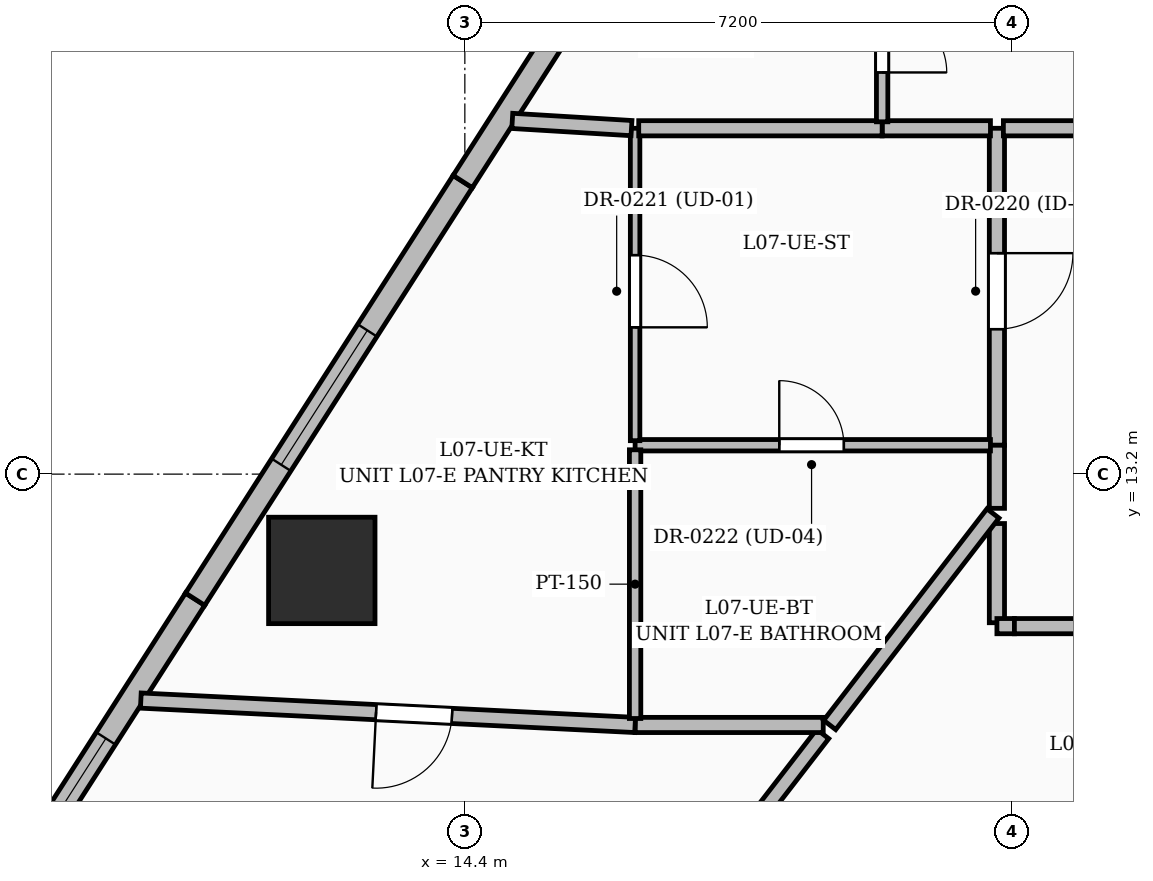
"""IFC4 building model, lengths in metres.
Left out: names, types, materials, properties, quantities, classifications, styles, units other than length and angle.
Written with IfcOpenShell. Run it as: python <this file> out.ifc"""

import sys

from ifc_helpers import new_model, si_unit, direction, frame, frame_2d, origin, origin_2d, place, context, subcontext, project, spatial, rectangle, extrude, element, fill, save


model = new_model("IFC4")
c1 = context("Model", 3, precision=1e-05, world=origin(), true_north=direction((0.0, 1.0)))
c2 = subcontext(c1, "Body", "Model", "MODEL_VIEW")
j1 = project(units=[si_unit("LENGTHUNIT", "METRE"), si_unit("PLANEANGLEUNIT", "RADIAN")], contexts=[c1])
p1 = place(None, origin())
s1 = spatial("IfcSite", under=j1, at=p1, CompositionType="ELEMENT")
p2 = place(p1, origin())
s2 = spatial("IfcBuilding", under=s1, at=p2, CompositionType="ELEMENT")
p3 = place(p2, frame((0.0, 0.0, 35.4)))
s3 = spatial("IfcBuildingStorey", under=s2, at=p3, CompositionType="ELEMENT", Elevation=35.4)
p4 = place(p3, frame((12.518, 11.933, 0.0), z_axis=(0.0, 0.0, 1.0), x_axis=(1.0, 0.0, 0.0)))
e1 = element("IfcColumn", 1, at=p4, inside=s3, PredefinedType="COLUMN", context=c2, shape_type="SweptSolid", body=[
    extrude(rectangle(XDim=1.4, YDim=1.4, at=origin_2d()), origin(), (0.0, 0.0, 1.0), 3.6),
])
p5 = place(p3, frame((7.668, 6.586, 0.0), z_axis=(0.0, 0.0, 1.0), x_axis=(0.539504449159, 0.841982748836, 0.0)))
e2 = element("IfcWall", 2, at=p5, inside=s3, PredefinedType="SOLIDWALL", context=c2, shape_type="SweptSolid", body=[
    extrude(rectangle(XDim=5.901, YDim=0.3, at=frame_2d((2.95, 0.0))), origin(), (0.0, 0.0, 1.0), 3.35),
])
p6 = place(p5, frame((1.325, 0.0, 0.6)))
e3 = element("IfcOpeningElement", 3, at=p6, cuts=e2, PredefinedType="OPENING", context=c2, shape_type="SweptSolid", body=[
    extrude(rectangle(XDim=2.4, YDim=2.1, at=frame_2d((1.2, 1.05))), frame((0.0, 0.16, 0.0), z_axis=(0.0, -1.0, 0.0), x_axis=(1.0, 0.0, 0.0)), (0.0, 0.0, 1.0), 0.32),
])
p7 = place(p3, frame((10.851, 11.555, 0.0), z_axis=(0.0, 0.0, 1.0), x_axis=(0.539526045631, 0.841968910403, 0.0)))
e4 = element("IfcWall", 4, at=p7, inside=s3, PredefinedType="SOLIDWALL", context=c2, shape_type="SweptSolid", body=[
    extrude(rectangle(XDim=6.526, YDim=0.3, at=frame_2d((3.263, 0.0))), origin(), (0.0, 0.0, 1.0), 3.35),
])
p8 = place(p7, frame((2.1, 0.0, 0.55)))
e5 = element("IfcOpeningElement", 5, at=p8, cuts=e4, PredefinedType="OPENING", context=c2, shape_type="SweptSolid", body=[
    extrude(rectangle(XDim=2.1, YDim=2.4, at=frame_2d((1.05, 1.2))), frame((0.0, 0.16, 0.0), z_axis=(0.0, -1.0, 0.0), x_axis=(1.0, 0.0, 0.0)), (0.0, 0.0, 1.0), 0.32),
])
p9 = place(p3, frame((14.372, 17.049, 0.0), z_axis=(0.0, 0.0, 1.0), x_axis=(0.539499522652, 0.841985905498, 0.0)))
e6 = element("IfcWall", 6, at=p9, inside=s3, PredefinedType="SOLIDWALL", context=c2, shape_type="SweptSolid", body=[
    extrude(rectangle(XDim=6.525, YDim=0.3, at=frame_2d((3.263, 0.0))), origin(), (0.0, 0.0, 1.0), 3.35),
])
p10 = place(p9, frame((4.175, 0.0, 0.8)))
e7 = element("IfcOpeningElement", 7, at=p10, cuts=e6, PredefinedType="OPENING", context=c2, shape_type="SweptSolid", body=[
    extrude(rectangle(XDim=1.2, YDim=1.8, at=frame_2d((0.6, 0.9))), frame((0.0, 0.16, 0.0), z_axis=(0.0, -1.0, 0.0), x_axis=(1.0, 0.0, 0.0)), (0.0, 0.0, 1.0), 0.32),
])
p11 = place(p3, frame((21.4, 12.55, 0.0), z_axis=(0.0, 0.0, 1.0), x_axis=(0.0, -1.0, 0.0)))
e8 = element("IfcWall", 8, at=p11, inside=s3, PredefinedType="PARTITIONING", context=c2, shape_type="SweptSolid", body=[
    extrude(rectangle(XDim=1.305, YDim=0.2, at=frame_2d((0.652, 0.0))), origin(), (0.0, 0.0, 1.0), 3.35),
])
p12 = place(p3, frame((21.4, 11.2, 0.0), z_axis=(0.0, 0.0, 1.0), x_axis=(1.0, 0.0, 0.0)))
e9 = element("IfcWall", 9, at=p12, inside=s3, PredefinedType="PARTITIONING", context=c2, shape_type="SweptSolid", body=[
    extrude(rectangle(XDim=0.23, YDim=0.2, at=frame_2d((0.115, 0.0))), origin(), (0.0, 0.0, 1.0), 2.712),
])
p13 = place(p3, frame((21.63, 11.2, 0.0), z_axis=(0.0, 0.0, 1.0), x_axis=(1.0, 0.0, 0.0)))
e10 = element("IfcWall", 10, at=p13, inside=s3, PredefinedType="PARTITIONING", context=c2, shape_type="SweptSolid", body=[
    extrude(rectangle(XDim=3.239, YDim=0.2, at=frame_2d((1.62, 0.0))), origin(), (0.0, 0.0, 1.0), 2.712),
])
p14 = place(p13, frame((1.185, 0.0, 0.0)))
e11 = element("IfcOpeningElement", 11, at=p14, cuts=e10, PredefinedType="OPENING", context=c2, shape_type="SweptSolid", body=[
    extrude(rectangle(XDim=0.95, YDim=2.2, at=frame_2d((0.475, 1.1))), frame((0.0, 0.11, 0.0), z_axis=(0.0, -1.0, 0.0), x_axis=(1.0, 0.0, 0.0)), (0.0, 0.0, 1.0), 0.22),
])
p15 = place(p3, frame((21.4, 17.75, 0.0), z_axis=(0.0, 0.0, 1.0), x_axis=(0.0, -1.0, 0.0)))
e12 = element("IfcWall", 12, at=p15, inside=s3, PredefinedType="PARTITIONING", context=c2, shape_type="SweptSolid", body=[
    extrude(rectangle(XDim=4.17, YDim=0.2, at=frame_2d((2.085, 0.0))), origin(), (0.0, 0.0, 1.0), 2.712),
])
p16 = place(p15, frame((1.643, 0.0, 0.0)))
e13 = element("IfcOpeningElement", 13, at=p16, cuts=e12, PredefinedType="OPENING", context=c2, shape_type="SweptSolid", body=[
    extrude(rectangle(XDim=1.0, YDim=2.2, at=frame_2d((0.5, 1.1))), frame((0.0, 0.11, 0.0), z_axis=(0.0, -1.0, 0.0), x_axis=(1.0, 0.0, 0.0)), (0.0, 0.0, 1.0), 0.22),
])
p17 = place(p3, frame((21.4, 13.58, 0.0), z_axis=(0.0, 0.0, 1.0), x_axis=(0.0, -1.0, 0.0)))
e14 = element("IfcWall", 14, at=p17, inside=s3, PredefinedType="PARTITIONING", context=c2, shape_type="SweptSolid", body=[
    extrude(rectangle(XDim=0.83, YDim=0.2, at=frame_2d((0.415, 0.0))), origin(), (0.0, 0.0, 1.0), 3.35),
])
p18 = place(p3, frame((24.4, 17.75, 0.0), z_axis=(0.0, 0.0, 1.0), x_axis=(-1.0, 0.0, 0.0)))
e15 = element("IfcWall", 15, at=p18, inside=s3, PredefinedType="PARTITIONING", context=c2, shape_type="SweptSolid", body=[
    extrude(rectangle(XDim=2.915, YDim=0.2, at=frame_2d((1.458, 0.0))), origin(), (0.0, 0.0, 1.0), 2.228),
])
p19 = place(p18, frame((1.05, 0.0, 0.0)))
e16 = element("IfcOpeningElement", 16, at=p19, cuts=e15, PredefinedType="OPENING", context=c2, shape_type="SweptSolid", body=[
    extrude(rectangle(XDim=0.9, YDim=2.1, at=frame_2d((0.45, 1.05))), frame((0.0, 0.11, 0.0), z_axis=(0.0, -1.0, 0.0), x_axis=(1.0, 0.0, 0.0)), (0.0, 0.0, 1.0), 0.22),
])
p20 = place(p3, frame((16.279, 6.118, 0.0), z_axis=(0.0, 0.0, 1.0), x_axis=(0.611231323246, 0.791452000745, 0.0)))
e17 = element("IfcWall", 17, at=p20, inside=s3, PredefinedType="PARTITIONING", context=c2, shape_type="SweptSolid", body=[
    extrude(rectangle(XDim=4.629, YDim=0.2, at=frame_2d((2.314, 0.0))), origin(), (0.0, 0.0, 1.0), 2.228),
])
p21 = place(p3, frame((19.115, 9.9, 0.0), z_axis=(0.0, 0.0, 1.0), x_axis=(-1.0, 0.0, 0.0)))
e18 = element("IfcWall", 18, at=p21, inside=s3, PredefinedType="PARTITIONING", context=c2, shape_type="SweptSolid", body=[
    extrude(rectangle(XDim=2.475, YDim=0.2, at=frame_2d((1.238, 0.0))), origin(), (0.0, 0.0, 1.0), 2.228),
])
p22 = place(p3, frame((16.64, 9.9, 0.0), z_axis=(0.0, 0.0, 1.0), x_axis=(-0.998783560552, 0.049309219933, 0.0)))
e19 = element("IfcWall", 19, at=p22, inside=s3, PredefinedType="PARTITIONING", context=c2, shape_type="SweptSolid", body=[
    extrude(rectangle(XDim=6.511, YDim=0.2, at=frame_2d((3.255, 0.0))), origin(), (0.0, 0.0, 1.0), 2.37),
])
p23 = place(p22, frame((2.412, 0.0, 0.0)))
e20 = element("IfcOpeningElement", 20, at=p23, cuts=e19, PredefinedType="OPENING", context=c2, shape_type="SweptSolid", body=[
    extrude(rectangle(XDim=1.0, YDim=2.2, at=frame_2d((0.5, 1.1))), frame((0.0, 0.11, 0.0), z_axis=(0.0, -1.0, 0.0), x_axis=(1.0, 0.0, 0.0)), (0.0, 0.0, 1.0), 0.22),
])
p24 = place(p3, frame((21.348, 12.683, 0.0), z_axis=(0.0, 0.0, 1.0), x_axis=(-0.611075844668, -0.791572051088, 0.0)))
e21 = element("IfcWall", 21, at=p24, inside=s3, PredefinedType="PARTITIONING", context=c2, shape_type="SweptSolid", body=[
    extrude(rectangle(XDim=3.515, YDim=0.2, at=frame_2d((1.758, 0.0))), origin(), (0.0, 0.0, 1.0), 2.228),
])
p25 = place(p3, frame((16.64, 13.58, 0.0), z_axis=(0.0, 0.0, 1.0), x_axis=(1.0, 0.0, 0.0)))
e22 = element("IfcWall", 22, at=p25, inside=s3, PredefinedType="PARTITIONING", context=c2, shape_type="SweptSolid", body=[
    extrude(rectangle(XDim=4.675, YDim=0.15, at=frame_2d((2.337, 0.0))), origin(), (0.0, 0.0, 1.0), 2.712),
])
p26 = place(p25, frame((1.896, 0.0, 0.0)))
e23 = element("IfcOpeningElement", 23, at=p26, cuts=e22, PredefinedType="OPENING", context=c2, shape_type="SweptSolid", body=[
    extrude(rectangle(XDim=0.85, YDim=2.1, at=frame_2d((0.425, 1.05))), frame((0.0, 0.085, 0.0), z_axis=(0.0, -1.0, 0.0), x_axis=(1.0, 0.0, 0.0)), (0.0, 0.0, 1.0), 0.17),
])
p27 = place(p3, frame((16.64, 17.75, 0.0), z_axis=(0.0, 0.0, 1.0), x_axis=(0.0, -1.0, 0.0)))
e24 = element("IfcWall", 24, at=p27, inside=s3, PredefinedType="PARTITIONING", context=c2, shape_type="SweptSolid", body=[
    extrude(rectangle(XDim=4.11, YDim=0.125, at=frame_2d((2.055, 0.0))), origin(), (0.0, 0.0, 1.0), 3.35),
])
p28 = place(p27, frame((1.669, 0.0, 0.0)))
e25 = element("IfcOpeningElement", 25, at=p28, cuts=e24, PredefinedType="OPENING", context=c2, shape_type="SweptSolid", body=[
    extrude(rectangle(XDim=0.95, YDim=2.2, at=frame_2d((0.475, 1.1))), frame((0.0, 0.072, 0.0), z_axis=(0.0, -1.0, 0.0), x_axis=(1.0, 0.0, 0.0)), (0.0, 0.0, 1.0), 0.145),
])
p29 = place(p3, frame((21.315, 17.75, 0.0), z_axis=(0.0, 0.0, 1.0), x_axis=(-1.0, 0.0, 0.0)))
e26 = element("IfcWall", 26, at=p29, inside=s3, PredefinedType="PARTITIONING", context=c2, shape_type="SweptSolid", body=[
    extrude(rectangle(XDim=1.425, YDim=0.2, at=frame_2d((0.712, 0.0))), origin(), (0.0, 0.0, 1.0), 2.712),
])
p30 = place(p3, frame((19.89, 17.75, 0.0), z_axis=(0.0, 0.0, 1.0), x_axis=(-1.0, 0.0, 0.0)))
e27 = element("IfcWall", 27, at=p30, inside=s3, PredefinedType="PARTITIONING", context=c2, shape_type="SweptSolid", body=[
    extrude(rectangle(XDim=3.202, YDim=0.2, at=frame_2d((1.601, 0.0))), origin(), (0.0, 0.0, 1.0), 3.35),
])
p31 = place(p3, frame((16.64, 13.52, 0.0), z_axis=(0.0, 0.0, 1.0), x_axis=(0.0, -1.0, 0.0)))
e28 = element("IfcWall", 28, at=p31, inside=s3, PredefinedType="PARTITIONING", context=c2, shape_type="SweptSolid", body=[
    extrude(rectangle(XDim=3.535, YDim=0.15, at=frame_2d((1.768, 0.0))), origin(), (0.0, 0.0, 1.0), 2.228),
])
p32 = place(p3, frame((16.593, 17.752, 0.0), z_axis=(0.0, 0.0, 1.0), x_axis=(-0.998181550188, 0.060279290502, 0.0)))
e29 = element("IfcWall", 29, at=p32, inside=s3, PredefinedType="PARTITIONING", context=c2, shape_type="SweptSolid", body=[
    extrude(rectangle(XDim=1.572, YDim=0.2, at=frame_2d((0.786, 0.0))), origin(), (0.0, 0.0, 1.0), 2.37),
])
p33 = place(p3, frame((19.89, 19.95, 0.0), z_axis=(0.0, 0.0, 1.0), x_axis=(0.0, -1.0, 0.0)))
e30 = element("IfcWall", 30, at=p33, inside=s3, PredefinedType="PARTITIONING", context=c2, shape_type="SweptSolid", body=[
    extrude(rectangle(XDim=2.115, YDim=0.15, at=frame_2d((1.058, 0.0))), origin(), (0.0, 0.0, 1.0), 3.35),
])
p34 = place(p33, frame((0.615, 0.0, 0.0)))
e31 = element("IfcOpeningElement", 31, at=p34, cuts=e30, PredefinedType="OPENING", context=c2, shape_type="SweptSolid", body=[
    extrude(rectangle(XDim=0.85, YDim=2.1, at=frame_2d((0.425, 1.05))), frame((0.0, 0.085, 0.0), z_axis=(0.0, -1.0, 0.0), x_axis=(1.0, 0.0, 0.0)), (0.0, 0.0, 1.0), 0.17),
])
p35 = place(p6, origin())
e32 = element("IfcWindow", 32, at=p35, inside=s3, PartitioningType="SINGLE_PANEL", PredefinedType="WINDOW", context=c2, shape_type="SweptSolid", body=[
    extrude(rectangle(XDim=2.4, YDim=2.1, at=frame_2d((1.2, 1.05))), frame((0.0, 0.03, 0.0), z_axis=(0.0, -1.0, 0.0), x_axis=(1.0, 0.0, 0.0)), (0.0, 0.0, 1.0), 0.06),
])
fill(e3, e32)
p36 = place(p8, origin())
e33 = element("IfcWindow", 33, at=p36, inside=s3, PartitioningType="SINGLE_PANEL", PredefinedType="WINDOW", context=c2, shape_type="SweptSolid", body=[
    extrude(rectangle(XDim=2.1, YDim=2.4, at=frame_2d((1.05, 1.2))), frame((0.0, 0.03, 0.0), z_axis=(0.0, -1.0, 0.0), x_axis=(1.0, 0.0, 0.0)), (0.0, 0.0, 1.0), 0.06),
])
fill(e5, e33)
p37 = place(p16, origin())
e34 = element("IfcDoor", 34, at=p37, inside=s3, OperationType="SINGLE_SWING_LEFT", PredefinedType="DOOR", context=c2, shape_type="SweptSolid", body=[
    extrude(rectangle(XDim=1.0, YDim=2.2, at=frame_2d((0.5, 1.1))), frame((0.0, 0.025, 0.0), z_axis=(0.0, -1.0, 0.0), x_axis=(1.0, 0.0, 0.0)), (0.0, 0.0, 1.0), 0.05),
])
fill(e13, e34)
p38 = place(p28, origin())
e35 = element("IfcDoor", 35, at=p38, inside=s3, OperationType="SINGLE_SWING_RIGHT", PredefinedType="DOOR", context=c2, shape_type="SweptSolid", body=[
    extrude(rectangle(XDim=0.95, YDim=2.2, at=frame_2d((0.475, 1.1))), frame((0.0, 0.025, 0.0), z_axis=(0.0, -1.0, 0.0), x_axis=(1.0, 0.0, 0.0)), (0.0, 0.0, 1.0), 0.05),
])
fill(e25, e35)
p39 = place(p26, origin())
e36 = element("IfcDoor", 36, at=p39, inside=s3, OperationType="SINGLE_SWING_LEFT", PredefinedType="DOOR", context=c2, shape_type="SweptSolid", body=[
    extrude(rectangle(XDim=0.85, YDim=2.1, at=frame_2d((0.425, 1.05))), frame((0.0, 0.025, 0.0), z_axis=(0.0, -1.0, 0.0), x_axis=(1.0, 0.0, 0.0)), (0.0, 0.0, 1.0), 0.05),
])
fill(e23, e36)
p40 = place(p34, origin())
e37 = element("IfcDoor", 37, at=p40, inside=s3, OperationType="SINGLE_SWING_RIGHT", PredefinedType="DOOR", context=c2, shape_type="SweptSolid", body=[
    extrude(rectangle(XDim=0.85, YDim=2.1, at=frame_2d((0.425, 1.05))), frame((0.0, 0.025, 0.0), z_axis=(0.0, -1.0, 0.0), x_axis=(1.0, 0.0, 0.0)), (0.0, 0.0, 1.0), 0.05),
])
fill(e31, e37)
p41 = place(p23, origin())
e38 = element("IfcDoor", 38, at=p41, inside=s3, OperationType="SINGLE_SWING_RIGHT", PredefinedType="DOOR", context=c2, shape_type="SweptSolid", body=[
    extrude(rectangle(XDim=1.0, YDim=2.2, at=frame_2d((0.5, 1.1))), frame((0.0, 0.025, 0.0), z_axis=(0.0, -1.0, 0.0), x_axis=(1.0, 0.0, 0.0)), (0.0, 0.0, 1.0), 0.05),
])
fill(e20, e38)
save(model, sys.argv[1])
